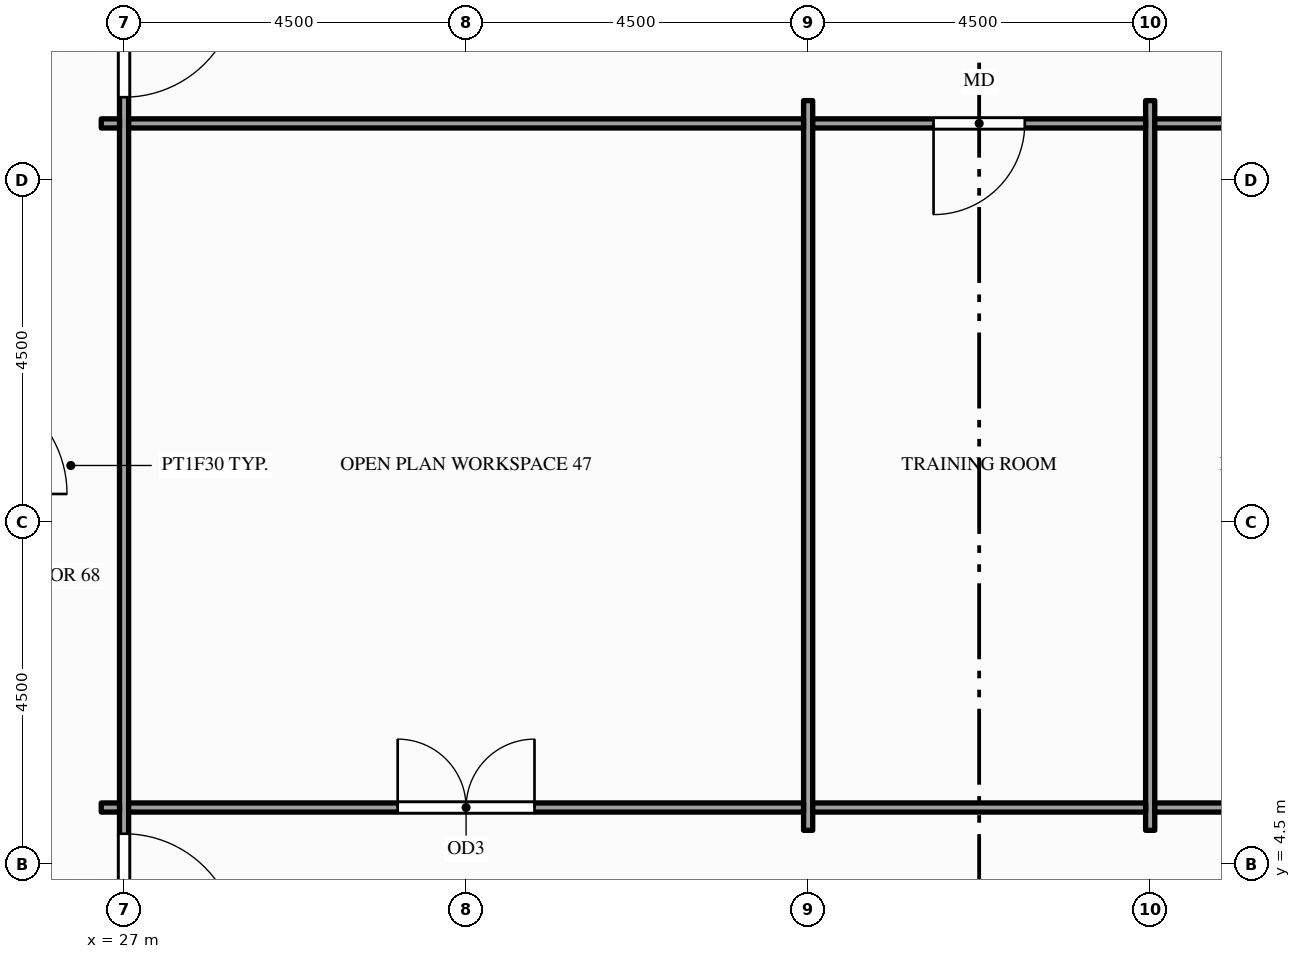
"""IFC4 building model, lengths in metres.
Left out: names, types, materials, properties, quantities, classifications, styles, units other than length and angle.
Written with IfcOpenShell. Run it as: python <this file> out.ifc"""

import sys

from ifc_helpers import new_model, si_unit, direction, frame, frame_2d, origin, place, context, subcontext, project, spatial, rectangle, extrude, element, fill, save


model = new_model("IFC4")
c1 = context("Model", 3, precision=1e-05, world=origin(), true_north=direction((0.0, 1.0)))
c2 = subcontext(c1, "Body", "Model", "MODEL_VIEW")
j1 = project(units=[si_unit("LENGTHUNIT", "METRE"), si_unit("PLANEANGLEUNIT", "RADIAN")], contexts=[c1])
p1 = place(None, origin())
s1 = spatial("IfcSite", under=j1, at=p1, CompositionType="ELEMENT")
p2 = place(p1, origin())
s2 = spatial("IfcBuilding", under=s1, at=p2, CompositionType="ELEMENT")
p3 = place(p2, frame((0.0, 0.0, 199.0)))
s3 = spatial("IfcBuildingStorey", under=s2, at=p3, CompositionType="ELEMENT", Elevation=199.0)
p4 = place(p3, frame((27.0, 2.7, 0.0), z_axis=(0.0, 0.0, 1.0), x_axis=(0.0, 1.0, 0.0)))
e1 = element("IfcWall", 1, at=p4, inside=s3, PredefinedType="PARTITIONING", context=c2, shape_type="SweptSolid", body=[
    extrude(rectangle(XDim=14.1, YDim=0.12, at=frame_2d((7.05, 0.0))), origin(), (0.0, 0.0, 1.0), 2.87),
])
p5 = place(p4, frame((0.705, 0.0, 0.0)))
e2 = element("IfcOpeningElement", 2, at=p5, cuts=e1, PredefinedType="OPENING", context=c2, shape_type="SweptSolid", body=[
    extrude(rectangle(XDim=1.5, YDim=2.1, at=frame_2d((0.75, 1.05))), frame((0.0, 0.07, 0.0), z_axis=(0.0, -1.0, 0.0), x_axis=(1.0, 0.0, 0.0)), (0.0, 0.0, 1.0), 0.14),
])
p6 = place(p4, frame((11.895, 0.0, 0.0)))
e3 = element("IfcOpeningElement", 3, at=p6, cuts=e1, PredefinedType="OPENING", context=c2, shape_type="SweptSolid", body=[
    extrude(rectangle(XDim=1.5, YDim=2.1, at=frame_2d((0.75, 1.05))), frame((0.0, 0.07, 0.0), z_axis=(0.0, -1.0, 0.0), x_axis=(1.0, 0.0, 0.0)), (0.0, 0.0, 1.0), 0.14),
])
for number, where, z_axis, x_axis in (
    (4, (36.0, 4.95, 0.0), (0.0, 0.0, 1.0), (0.0, 1.0, 0.0)),
    (5, (40.5, 4.95, 0.0), (0.0, 0.0, 1.0), (0.0, 1.0, 0.0)),
):
    element("IfcWall", number, at=place(p3, frame(where, z_axis=z_axis, x_axis=x_axis)), inside=s3, PredefinedType="PARTITIONING", context=c2, shape_type="SweptSolid", body=[
        extrude(rectangle(XDim=9.6, YDim=0.12, at=frame_2d((4.8, 0.0))), origin(), (0.0, 0.0, 1.0), 2.87),
    ])
p7 = place(p3, frame((26.7, 5.25, 0.0), z_axis=(0.0, 0.0, 1.0), x_axis=(1.0, 0.0, 0.0)))
e6 = element("IfcWall", 6, at=p7, inside=s3, PredefinedType="PARTITIONING", context=c2, shape_type="SweptSolid", body=[
    extrude(rectangle(XDim=0.24, YDim=0.12, at=frame_2d((0.12, 0.0))), origin(), (0.0, 0.0, 1.0), 2.87),
])
p8 = place(p3, frame((27.06, 5.25, 0.0), z_axis=(0.0, 0.0, 1.0), x_axis=(1.0, 0.0, 0.0)))
e7 = element("IfcWall", 7, at=p8, inside=s3, PredefinedType="PARTITIONING", context=c2, shape_type="SweptSolid", body=[
    extrude(rectangle(XDim=8.88, YDim=0.12, at=frame_2d((4.44, 0.0))), origin(), (0.0, 0.0, 1.0), 2.87),
])
p9 = place(p8, frame((3.54, 0.0, 0.0)))
e8 = element("IfcOpeningElement", 8, at=p9, cuts=e7, PredefinedType="OPENING", context=c2, shape_type="SweptSolid", body=[
    extrude(rectangle(XDim=1.8, YDim=2.1, at=frame_2d((0.9, 1.05))), frame((0.0, 0.07, 0.0), z_axis=(0.0, -1.0, 0.0), x_axis=(1.0, 0.0, 0.0)), (0.0, 0.0, 1.0), 0.14),
])
p10 = place(p3, frame((36.06, 5.25, 0.0), z_axis=(0.0, 0.0, 1.0), x_axis=(1.0, 0.0, 0.0)))
e9 = element("IfcWall", 9, at=p10, inside=s3, PredefinedType="PARTITIONING", context=c2, shape_type="SweptSolid", body=[
    extrude(rectangle(XDim=4.38, YDim=0.12, at=frame_2d((2.19, 0.0))), origin(), (0.0, 0.0, 1.0), 2.87),
])
p11 = place(p3, frame((40.56, 5.25, 0.0), z_axis=(0.0, 0.0, 1.0), x_axis=(1.0, 0.0, 0.0)))
e10 = element("IfcWall", 10, at=p11, inside=s3, PredefinedType="PARTITIONING", context=c2, shape_type="SweptSolid", body=[
    extrude(rectangle(XDim=4.38, YDim=0.12, at=frame_2d((2.19, 0.0))), origin(), (0.0, 0.0, 1.0), 2.87),
])
p12 = place(p11, frame((1.74, 0.0, 0.0)))
e11 = element("IfcOpeningElement", 11, at=p12, cuts=e10, PredefinedType="OPENING", context=c2, shape_type="SweptSolid", body=[
    extrude(rectangle(XDim=0.9, YDim=2.1, at=frame_2d((0.45, 1.05))), frame((0.0, 0.07, 0.0), z_axis=(0.0, -1.0, 0.0), x_axis=(1.0, 0.0, 0.0)), (0.0, 0.0, 1.0), 0.14),
])
p13 = place(p3, frame((26.7, 14.25, 0.0), z_axis=(0.0, 0.0, 1.0), x_axis=(1.0, 0.0, 0.0)))
e12 = element("IfcWall", 12, at=p13, inside=s3, PredefinedType="PARTITIONING", context=c2, shape_type="SweptSolid", body=[
    extrude(rectangle(XDim=0.24, YDim=0.12, at=frame_2d((0.12, 0.0))), origin(), (0.0, 0.0, 1.0), 2.87),
])
p14 = place(p3, frame((27.06, 14.25, 0.0), z_axis=(0.0, 0.0, 1.0), x_axis=(1.0, 0.0, 0.0)))
e13 = element("IfcWall", 13, at=p14, inside=s3, PredefinedType="PARTITIONING", context=c2, shape_type="SweptSolid", body=[
    extrude(rectangle(XDim=8.88, YDim=0.12, at=frame_2d((4.44, 0.0))), origin(), (0.0, 0.0, 1.0), 2.87),
])
p15 = place(p3, frame((36.06, 14.25, 0.0), z_axis=(0.0, 0.0, 1.0), x_axis=(1.0, 0.0, 0.0)))
e14 = element("IfcWall", 14, at=p15, inside=s3, PredefinedType="PARTITIONING", context=c2, shape_type="SweptSolid", body=[
    extrude(rectangle(XDim=4.38, YDim=0.12, at=frame_2d((2.19, 0.0))), origin(), (0.0, 0.0, 1.0), 2.87),
])
p16 = place(p15, frame((1.59, 0.0, 0.0)))
e15 = element("IfcOpeningElement", 15, at=p16, cuts=e14, PredefinedType="OPENING", context=c2, shape_type="SweptSolid", body=[
    extrude(rectangle(XDim=1.2, YDim=2.1, at=frame_2d((0.6, 1.05))), frame((0.0, 0.07, 0.0), z_axis=(0.0, -1.0, 0.0), x_axis=(1.0, 0.0, 0.0)), (0.0, 0.0, 1.0), 0.14),
])
p17 = place(p3, frame((40.56, 14.25, 0.0), z_axis=(0.0, 0.0, 1.0), x_axis=(1.0, 0.0, 0.0)))
e16 = element("IfcWall", 16, at=p17, inside=s3, PredefinedType="PARTITIONING", context=c2, shape_type="SweptSolid", body=[
    extrude(rectangle(XDim=4.38, YDim=0.12, at=frame_2d((2.19, 0.0))), origin(), (0.0, 0.0, 1.0), 2.87),
])
p18 = place(p5, origin())
e17 = element("IfcDoor", 17, at=p18, inside=s3, OperationType="SINGLE_SWING_LEFT", PredefinedType="DOOR", context=c2, shape_type="SweptSolid", body=[
    extrude(rectangle(XDim=1.5, YDim=2.1, at=frame_2d((0.75, 1.05))), frame((0.0, 0.025, 0.0), z_axis=(0.0, -1.0, 0.0), x_axis=(1.0, 0.0, 0.0)), (0.0, 0.0, 1.0), 0.05),
])
fill(e2, e17)
p19 = place(p6, origin())
e18 = element("IfcDoor", 18, at=p19, inside=s3, OperationType="SINGLE_SWING_RIGHT", PredefinedType="DOOR", context=c2, shape_type="SweptSolid", body=[
    extrude(rectangle(XDim=1.5, YDim=2.1, at=frame_2d((0.75, 1.05))), frame((0.0, 0.025, 0.0), z_axis=(0.0, -1.0, 0.0), x_axis=(1.0, 0.0, 0.0)), (0.0, 0.0, 1.0), 0.05),
])
fill(e3, e18)
p20 = place(p9, origin())
e19 = element("IfcDoor", 19, at=p20, inside=s3, OperationType="DOUBLE_DOOR_SINGLE_SWING", PredefinedType="DOOR", context=c2, shape_type="SweptSolid", body=[
    extrude(rectangle(XDim=1.8, YDim=2.1, at=frame_2d((0.9, 1.05))), frame((0.0, 0.025, 0.0), z_axis=(0.0, -1.0, 0.0), x_axis=(1.0, 0.0, 0.0)), (0.0, 0.0, 1.0), 0.05),
])
fill(e8, e19)
p21 = place(p16, origin())
e20 = element("IfcDoor", 20, at=p21, inside=s3, OperationType="SINGLE_SWING_LEFT", PredefinedType="DOOR", context=c2, shape_type="SweptSolid", body=[
    extrude(rectangle(XDim=1.2, YDim=2.1, at=frame_2d((0.6, 1.05))), frame((0.0, 0.025, 0.0), z_axis=(0.0, -1.0, 0.0), x_axis=(1.0, 0.0, 0.0)), (0.0, 0.0, 1.0), 0.05),
])
fill(e15, e20)
save(model, sys.argv[1])
